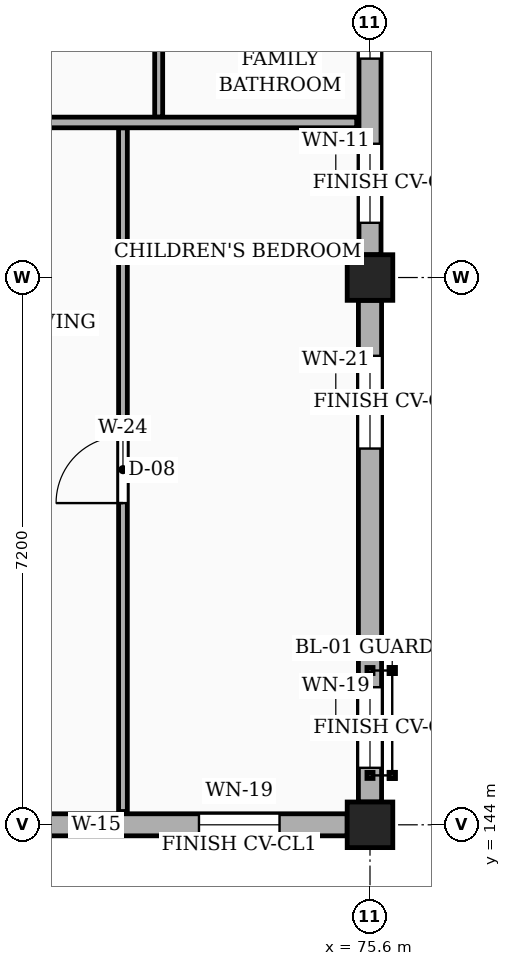
"""IFC4 building model, lengths in metres.
Left out: names, types, materials, properties, quantities, classifications, styles, units other than length and angle.
Written with IfcOpenShell. Run it as: python <this file> out.ifc"""

import sys

from ifc_helpers import new_model, si_unit, direction, frame, frame_2d, origin, origin_2d, place, context, subcontext, project, spatial, rectangle, extrude, element, fill, save


model = new_model("IFC4")
c1 = context("Model", 3, precision=1e-05, world=origin(), true_north=direction((0.0, 1.0)))
c2 = subcontext(c1, "Body", "Model", "MODEL_VIEW")
j1 = project(units=[si_unit("LENGTHUNIT", "METRE"), si_unit("PLANEANGLEUNIT", "RADIAN")], contexts=[c1])
p1 = place(None, origin())
s1 = spatial("IfcSite", under=j1, at=p1, CompositionType="ELEMENT")
p2 = place(p1, origin())
s2 = spatial("IfcBuilding", under=s1, at=p2, CompositionType="ELEMENT")
p3 = place(p2, frame((0.0, 0.0, 7.65)))
s3 = spatial("IfcBuildingStorey", under=s2, at=p3, CompositionType="ELEMENT", Elevation=7.65)
for number, where, z_axis, x_axis in (
    (1, (75.6, 144.0, 0.0), (0.0, 0.0, 1.0), (1.0, 0.0, 0.0)),
    (2, (75.6, 151.2, 0.0), (0.0, 0.0, 1.0), (1.0, 0.0, 0.0)),
):
    element("IfcColumn", number, at=place(p3, frame(where, z_axis=z_axis, x_axis=x_axis)), inside=s3, PredefinedType="COLUMN", context=c2, shape_type="SweptSolid", body=[
        extrude(rectangle(XDim=0.6, YDim=0.6, at=origin_2d()), origin(), (0.0, 0.0, 1.0), 3.15),
    ])
p4 = place(p3, frame((68.7, 144.0, 0.0), z_axis=(0.0, 0.0, 1.0), x_axis=(1.0, 0.0, 0.0)))
e3 = element("IfcWall", 3, at=p4, inside=s3, PredefinedType="SOLIDWALL", context=c2, shape_type="SweptSolid", body=[
    extrude(rectangle(XDim=6.6, YDim=0.29, at=frame_2d((3.3, 0.0))), origin(), (0.0, 0.0, 1.0), 2.455),
])
p5 = place(p4, frame((0.45, 0.0, 0.78)))
e4 = element("IfcOpeningElement", 4, at=p5, cuts=e3, PredefinedType="OPENING", context=c2, shape_type="SweptSolid", body=[
    extrude(rectangle(XDim=0.9, YDim=1.36, at=frame_2d((0.45, 0.68))), frame((0.0, 0.155, 0.0), z_axis=(0.0, -1.0, 0.0), x_axis=(1.0, 0.0, 0.0)), (0.0, 0.0, 1.0), 0.31),
])
p6 = place(p4, frame((4.65, 0.0, 0.78)))
e5 = element("IfcOpeningElement", 5, at=p6, cuts=e3, PredefinedType="OPENING", context=c2, shape_type="SweptSolid", body=[
    extrude(rectangle(XDim=1.06, YDim=1.36, at=frame_2d((0.53, 0.68))), frame((0.0, 0.155, 0.0), z_axis=(0.0, -1.0, 0.0), x_axis=(1.0, 0.0, 0.0)), (0.0, 0.0, 1.0), 0.31),
])
p7 = place(p3, frame((75.6, 144.3, 0.0), z_axis=(0.0, 0.0, 1.0), x_axis=(0.0, 1.0, 0.0)))
e6 = element("IfcWall", 6, at=p7, inside=s3, PredefinedType="SOLIDWALL", context=c2, shape_type="SweptSolid", body=[
    extrude(rectangle(XDim=6.6, YDim=0.305, at=frame_2d((3.3, 0.0))), origin(), (0.0, 0.0, 1.0), 2.455),
])
p8 = place(p7, frame((0.45, 0.0, 0.78)))
e7 = element("IfcOpeningElement", 7, at=p8, cuts=e6, PredefinedType="OPENING", context=c2, shape_type="SweptSolid", body=[
    extrude(rectangle(XDim=1.06, YDim=1.36, at=frame_2d((0.53, 0.68))), frame((0.0, 0.163, 0.0), z_axis=(0.0, -1.0, 0.0), x_axis=(1.0, 0.0, 0.0)), (0.0, 0.0, 1.0), 0.325),
])
p9 = place(p7, frame((4.65, 0.0, 0.78)))
e8 = element("IfcOpeningElement", 8, at=p9, cuts=e6, PredefinedType="OPENING", context=c2, shape_type="SweptSolid", body=[
    extrude(rectangle(XDim=1.22, YDim=1.36, at=frame_2d((0.61, 0.68))), frame((0.0, 0.163, 0.0), z_axis=(0.0, -1.0, 0.0), x_axis=(1.0, 0.0, 0.0)), (0.0, 0.0, 1.0), 0.325),
])
p10 = place(p3, frame((75.6, 151.5, 0.0), z_axis=(0.0, 0.0, 1.0), x_axis=(0.0, 1.0, 0.0)))
e9 = element("IfcWall", 9, at=p10, inside=s3, PredefinedType="SOLIDWALL", context=c2, shape_type="SweptSolid", body=[
    extrude(rectangle(XDim=6.6, YDim=0.29, at=frame_2d((3.3, 0.0))), origin(), (0.0, 0.0, 1.0), 2.455),
])
p11 = place(p10, frame((0.42, 0.0, 0.78)))
e10 = element("IfcOpeningElement", 10, at=p11, cuts=e9, PredefinedType="OPENING", context=c2, shape_type="SweptSolid", body=[
    extrude(rectangle(XDim=1.04, YDim=1.26, at=frame_2d((0.52, 0.63))), frame((0.0, 0.155, 0.0), z_axis=(0.0, -1.0, 0.0), x_axis=(1.0, 0.0, 0.0)), (0.0, 0.0, 1.0), 0.31),
])
p12 = place(p10, frame((2.58, 0.0, 0.78)))
e11 = element("IfcOpeningElement", 11, at=p12, cuts=e9, PredefinedType="OPENING", context=c2, shape_type="SweptSolid", body=[
    extrude(rectangle(XDim=1.38, YDim=1.36, at=frame_2d((0.69, 0.68))), frame((0.0, 0.155, 0.0), z_axis=(0.0, -1.0, 0.0), x_axis=(1.0, 0.0, 0.0)), (0.0, 0.0, 1.0), 0.31),
])
p13 = place(p10, frame((5.16, 0.0, 0.78)))
e12 = element("IfcOpeningElement", 12, at=p13, cuts=e9, PredefinedType="OPENING", context=c2, shape_type="SweptSolid", body=[
    extrude(rectangle(XDim=0.94, YDim=1.44, at=frame_2d((0.47, 0.72))), frame((0.0, 0.155, 0.0), z_axis=(0.0, -1.0, 0.0), x_axis=(1.0, 0.0, 0.0)), (0.0, 0.0, 1.0), 0.31),
])
p14 = place(p3, frame((72.35, 144.175, 0.0), z_axis=(0.0, 0.0, 1.0), x_axis=(0.0, 1.0, 0.0)))
e13 = element("IfcWall", 13, at=p14, inside=s3, PredefinedType="PARTITIONING", context=c2, shape_type="SweptSolid", body=[
    extrude(rectangle(XDim=8.995, YDim=0.115, at=frame_2d((4.498, 0.0))), origin(), (0.0, 0.0, 1.0), 2.32),
])
p15 = place(p14, frame((4.058, 0.0, 0.0)))
e14 = element("IfcOpeningElement", 14, at=p15, cuts=e13, PredefinedType="OPENING", context=c2, shape_type="SweptSolid", body=[
    extrude(rectangle(XDim=0.88, YDim=2.08, at=frame_2d((0.44, 1.04))), frame((0.0, 0.067, 0.0), z_axis=(0.0, -1.0, 0.0), x_axis=(1.0, 0.0, 0.0)), (0.0, 0.0, 1.0), 0.135),
])
p16 = place(p3, frame((72.82, 153.31, 0.0), z_axis=(0.0, 0.0, 1.0), x_axis=(0.0, 1.0, 0.0)))
e15 = element("IfcWall", 15, at=p16, inside=s3, PredefinedType="PARTITIONING", context=c2, shape_type="SweptSolid", body=[
    extrude(rectangle(XDim=2.9, YDim=0.105, at=frame_2d((1.45, 0.0))), origin(), (0.0, 0.0, 1.0), 2.32),
])
p17 = place(p16, frame((1.015, 0.0, 0.0)))
e16 = element("IfcOpeningElement", 16, at=p17, cuts=e15, PredefinedType="OPENING", context=c2, shape_type="SweptSolid", body=[
    extrude(rectangle(XDim=0.87, YDim=2.05, at=frame_2d((0.435, 1.025))), frame((0.0, 0.062, 0.0), z_axis=(0.0, -1.0, 0.0), x_axis=(1.0, 0.0, 0.0)), (0.0, 0.0, 1.0), 0.125),
])
p18 = place(p3, frame((68.54, 153.24, 0.0), z_axis=(0.0, 0.0, 1.0), x_axis=(1.0, 0.0, 0.0)))
e17 = element("IfcWall", 17, at=p18, inside=s3, PredefinedType="PARTITIONING", context=c2, shape_type="SweptSolid", body=[
    extrude(rectangle(XDim=6.885, YDim=0.14, at=frame_2d((3.442, 0.0))), origin(), (0.0, 0.0, 1.0), 2.32),
])
p19 = place(p18, frame((1.31, 0.0, 0.0)))
e18 = element("IfcOpeningElement", 18, at=p19, cuts=e17, PredefinedType="OPENING", context=c2, shape_type="SweptSolid", body=[
    extrude(rectangle(XDim=0.92, YDim=2.1, at=frame_2d((0.46, 1.05))), frame((0.0, 0.08, 0.0), z_axis=(0.0, -1.0, 0.0), x_axis=(1.0, 0.0, 0.0)), (0.0, 0.0, 1.0), 0.16),
])
p20 = place(p6, origin())
e19 = element("IfcWindow", 19, at=p20, inside=s3, PartitioningType="SINGLE_PANEL", PredefinedType="WINDOW", context=c2, shape_type="SweptSolid", body=[
    extrude(rectangle(XDim=1.06, YDim=1.36, at=frame_2d((0.53, 0.68))), frame((0.0, 0.03, 0.0), z_axis=(0.0, -1.0, 0.0), x_axis=(1.0, 0.0, 0.0)), (0.0, 0.0, 1.0), 0.06),
])
fill(e5, e19)
p21 = place(p8, origin())
e20 = element("IfcWindow", 20, at=p21, inside=s3, PartitioningType="SINGLE_PANEL", PredefinedType="WINDOW", context=c2, shape_type="SweptSolid", body=[
    extrude(rectangle(XDim=1.06, YDim=1.36, at=frame_2d((0.53, 0.68))), frame((0.0, 0.03, 0.0), z_axis=(0.0, -1.0, 0.0), x_axis=(1.0, 0.0, 0.0)), (0.0, 0.0, 1.0), 0.06),
])
fill(e7, e20)
p22 = place(p9, origin())
e21 = element("IfcWindow", 21, at=p22, inside=s3, PartitioningType="SINGLE_PANEL", PredefinedType="WINDOW", context=c2, shape_type="SweptSolid", body=[
    extrude(rectangle(XDim=1.22, YDim=1.36, at=frame_2d((0.61, 0.68))), frame((0.0, 0.03, 0.0), z_axis=(0.0, -1.0, 0.0), x_axis=(1.0, 0.0, 0.0)), (0.0, 0.0, 1.0), 0.06),
])
fill(e8, e21)
p23 = place(p11, origin())
e22 = element("IfcWindow", 22, at=p23, inside=s3, PartitioningType="SINGLE_PANEL", PredefinedType="WINDOW", context=c2, shape_type="SweptSolid", body=[
    extrude(rectangle(XDim=1.04, YDim=1.26, at=frame_2d((0.52, 0.63))), frame((0.0, 0.03, 0.0), z_axis=(0.0, -1.0, 0.0), x_axis=(1.0, 0.0, 0.0)), (0.0, 0.0, 1.0), 0.06),
])
fill(e10, e22)
p24 = place(p12, origin())
e23 = element("IfcWindow", 23, at=p24, inside=s3, PartitioningType="SINGLE_PANEL", PredefinedType="WINDOW", context=c2, shape_type="SweptSolid", body=[
    extrude(rectangle(XDim=1.38, YDim=1.36, at=frame_2d((0.69, 0.68))), frame((0.0, 0.03, 0.0), z_axis=(0.0, -1.0, 0.0), x_axis=(1.0, 0.0, 0.0)), (0.0, 0.0, 1.0), 0.06),
])
fill(e11, e23)
p25 = place(p15, origin())
e24 = element("IfcDoor", 24, at=p25, inside=s3, OperationType="SINGLE_SWING_LEFT", PredefinedType="DOOR", context=c2, shape_type="SweptSolid", body=[
    extrude(rectangle(XDim=0.88, YDim=2.08, at=frame_2d((0.44, 1.04))), frame((0.0, 0.025, 0.0), z_axis=(0.0, -1.0, 0.0), x_axis=(1.0, 0.0, 0.0)), (0.0, 0.0, 1.0), 0.05),
])
fill(e14, e24)
save(model, sys.argv[1])
